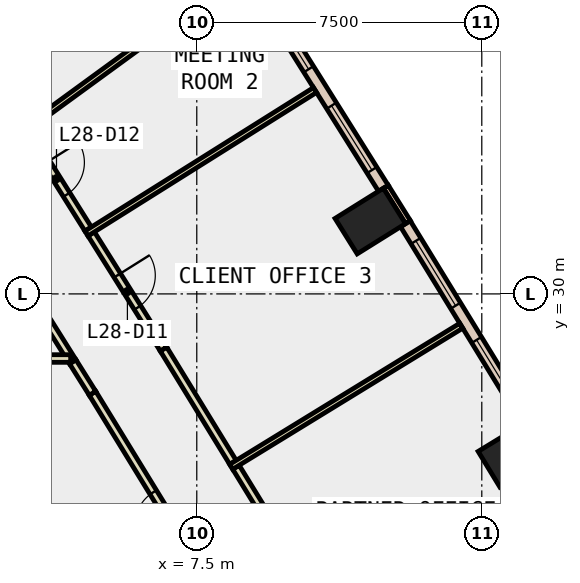
"""IFC4 building model, lengths in metres.
Left out: names, types, materials, properties, quantities, classifications, styles, units other than length and angle.
Written with IfcOpenShell. Run it as: python <this file> out.ifc"""

import sys

from ifc_helpers import new_model, si_unit, direction, frame, frame_2d, origin, origin_2d, place, context, subcontext, project, spatial, rectangle, extrude, element, fill, save


model = new_model("IFC4")
c1 = context("Model", 3, precision=1e-05, world=origin(), true_north=direction((0.0, 1.0)))
c2 = subcontext(c1, "Body", "Model", "MODEL_VIEW")
j1 = project(units=[si_unit("LENGTHUNIT", "METRE"), si_unit("PLANEANGLEUNIT", "RADIAN")], contexts=[c1])
p1 = place(None, origin())
s1 = spatial("IfcSite", under=j1, at=p1, CompositionType="ELEMENT")
p2 = place(p1, origin())
s2 = spatial("IfcBuilding", under=s1, at=p2, CompositionType="ELEMENT")
p3 = place(p2, frame((0.0, 0.0, 128.6)))
s3 = spatial("IfcBuildingStorey", under=s2, at=p3, CompositionType="ELEMENT", Elevation=128.6)
for number, where, z_axis, x_axis in (
    (1, (15.831, 25.776, -0.4), (0.0, 0.0, 1.0), (-0.52, 0.854, 0.0)),
    (2, (12.066, 31.917, -0.4), (0.0, 0.0, 1.0), (-0.53, 0.848, 0.0)),
):
    element("IfcColumn", number, at=place(p3, frame(where, z_axis=z_axis, x_axis=x_axis)), inside=s3, PredefinedType="COLUMN", context=c2, shape_type="SweptSolid", body=[
        extrude(rectangle(XDim=1.1, YDim=1.5, at=origin_2d()), origin(), (0.0, 0.0, 1.0), 4.0),
    ])
p4 = place(p3, frame((13.057, 31.888, 0.0), z_axis=(0.0, 0.0, 1.0), x_axis=(-0.529719642941, 0.848172800721, 0.0)))
e3 = element("IfcWall", 3, at=p4, inside=s3, PredefinedType="STANDARD", context=c2, shape_type="SweptSolid", body=[
    extrude(rectangle(XDim=1.1, YDim=0.15, at=frame_2d((0.55, 0.0))), origin(), (0.0, 0.0, 1.0), 3.6),
])
p5 = place(p3, frame((16.185, 26.634, 0.0), z_axis=(0.0, 0.0, 1.0), x_axis=(-0.522757750181, 0.8524812811, 0.0)))
e4 = element("IfcWall", 4, at=p5, inside=s3, PredefinedType="STANDARD", context=c2, shape_type="SweptSolid", body=[
    extrude(rectangle(XDim=6.114, YDim=0.3, at=frame_2d((3.057, 0.0))), origin(), (0.0, 0.0, 1.0), 3.6),
])
p6 = place(p5, frame((0.528, 0.0, 0.9)))
e5 = element("IfcOpeningElement", 5, at=p6, cuts=e4, PredefinedType="OPENING", context=c2, shape_type="SweptSolid", body=[
    extrude(rectangle(XDim=2.0, YDim=2.6, at=frame_2d((1.0, 1.3))), frame((0.0, 0.16, 0.0), z_axis=(0.0, -1.0, 0.0), x_axis=(1.0, 0.0, 0.0)), (0.0, 0.0, 1.0), 0.32),
])
p7 = place(p5, frame((3.585, 0.0, 0.9)))
e6 = element("IfcOpeningElement", 6, at=p7, cuts=e4, PredefinedType="OPENING", context=c2, shape_type="SweptSolid", body=[
    extrude(rectangle(XDim=2.0, YDim=2.6, at=frame_2d((1.0, 1.3))), frame((0.0, 0.16, 0.0), z_axis=(0.0, -1.0, 0.0), x_axis=(1.0, 0.0, 0.0)), (0.0, 0.0, 1.0), 0.32),
])
p8 = place(p3, frame((12.41, 32.779, 0.0), z_axis=(0.0, 0.0, 1.0), x_axis=(-0.53160564075, 0.846991996847, 0.0)))
e7 = element("IfcWall", 7, at=p8, inside=s3, PredefinedType="STANDARD", context=c2, shape_type="SweptSolid", body=[
    extrude(rectangle(XDim=6.266, YDim=0.3, at=frame_2d((3.133, 0.0))), origin(), (0.0, 0.0, 1.0), 3.6),
])
p9 = place(p8, frame((0.566, 0.0, 0.9)))
e8 = element("IfcOpeningElement", 8, at=p9, cuts=e7, PredefinedType="OPENING", context=c2, shape_type="SweptSolid", body=[
    extrude(rectangle(XDim=2.0, YDim=2.6, at=frame_2d((1.0, 1.3))), frame((0.0, 0.16, 0.0), z_axis=(0.0, -1.0, 0.0), x_axis=(1.0, 0.0, 0.0)), (0.0, 0.0, 1.0), 0.32),
])
p10 = place(p8, frame((3.699, 0.0, 0.9)))
e9 = element("IfcOpeningElement", 9, at=p10, cuts=e7, PredefinedType="OPENING", context=c2, shape_type="SweptSolid", body=[
    extrude(rectangle(XDim=2.0, YDim=2.6, at=frame_2d((1.0, 1.3))), frame((0.0, 0.16, 0.0), z_axis=(0.0, -1.0, 0.0), x_axis=(1.0, 0.0, 0.0)), (0.0, 0.0, 1.0), 0.32),
])
p11 = place(p3, frame((8.475, 21.321, 0.0), z_axis=(0.0, 0.0, 1.0), x_axis=(-0.522743103274, 0.852490262689, 0.0)))
e10 = element("IfcWall", 10, at=p11, inside=s3, PredefinedType="PARTITIONING", context=c2, shape_type="SweptSolid", body=[
    extrude(rectangle(XDim=7.115, YDim=0.2, at=frame_2d((3.557, 0.0))), origin(), (0.0, 0.0, 1.0), 3.6),
])
p12 = place(p11, frame((3.057, 0.0, 0.0)))
e11 = element("IfcOpeningElement", 11, at=p12, cuts=e10, PredefinedType="OPENING", context=c2, shape_type="SweptSolid", body=[
    extrude(rectangle(XDim=1.0, YDim=2.1, at=frame_2d((0.5, 1.05))), frame((0.0, 0.11, 0.0), z_axis=(0.0, -1.0, 0.0), x_axis=(1.0, 0.0, 0.0)), (0.0, 0.0, 1.0), 0.22),
])
p13 = place(p3, frame((4.756, 27.386, 0.0), z_axis=(0.0, 0.0, 1.0), x_axis=(-0.531343659666, 0.84715637006, 0.0)))
e12 = element("IfcWall", 12, at=p13, inside=s3, PredefinedType="PARTITIONING", context=c2, shape_type="SweptSolid", body=[
    extrude(rectangle(XDim=0.979, YDim=0.2, at=frame_2d((0.489, 0.0))), origin(), (0.0, 0.0, 1.0), 3.6),
])
p14 = place(p3, frame((4.236, 28.215, 0.0), z_axis=(0.0, 0.0, 1.0), x_axis=(-0.531602694807, 0.84699384583, 0.0)))
e13 = element("IfcWall", 13, at=p14, inside=s3, PredefinedType="PARTITIONING", context=c2, shape_type="SweptSolid", body=[
    extrude(rectangle(XDim=4.923, YDim=0.2, at=frame_2d((2.461, 0.0))), origin(), (0.0, 0.0, 1.0), 3.6),
])
p15 = place(p14, frame((1.961, 0.0, 0.0)))
e14 = element("IfcOpeningElement", 14, at=p15, cuts=e13, PredefinedType="OPENING", context=c2, shape_type="SweptSolid", body=[
    extrude(rectangle(XDim=1.0, YDim=2.1, at=frame_2d((0.5, 1.05))), frame((0.0, 0.11, 0.0), z_axis=(0.0, -1.0, 0.0), x_axis=(1.0, 0.0, 0.0)), (0.0, 0.0, 1.0), 0.22),
])
p16 = place(p3, frame((8.531, 25.439, 0.0), z_axis=(0.0, 0.0, 1.0), x_axis=(0.522704631836, -0.852513852003, 0.0)))
e15 = element("IfcWall", 15, at=p16, inside=s3, PredefinedType="PARTITIONING", context=c2, shape_type="SweptSolid", body=[
    extrude(rectangle(XDim=3.493, YDim=0.2, at=frame_2d((1.747, 0.0))), origin(), (0.0, 0.0, 1.0), 3.6),
])
p17 = place(p3, frame((4.722, 31.579, 0.0), z_axis=(0.0, 0.0, 1.0), x_axis=(0.531664655861, -0.846954953766, 0.0)))
e16 = element("IfcWall", 16, at=p17, inside=s3, PredefinedType="PARTITIONING", context=c2, shape_type="SweptSolid", body=[
    extrude(rectangle(XDim=3.581, YDim=0.2, at=frame_2d((1.791, 0.0))), origin(), (0.0, 0.0, 1.0), 3.6),
])
p18 = place(p17, frame((1.291, 0.0, 0.0)))
e17 = element("IfcOpeningElement", 17, at=p18, cuts=e16, PredefinedType="OPENING", context=c2, shape_type="SweptSolid", body=[
    extrude(rectangle(XDim=1.0, YDim=2.1, at=frame_2d((0.5, 1.05))), frame((0.0, 0.11, 0.0), z_axis=(0.0, -1.0, 0.0), x_axis=(1.0, 0.0, 0.0)), (0.0, 0.0, 1.0), 0.22),
])
p19 = place(p3, frame((6.626, 28.546, 0.0), z_axis=(0.0, 0.0, 1.0), x_axis=(0.522580081027, -0.852590205734, 0.0)))
e18 = element("IfcWall", 18, at=p19, inside=s3, PredefinedType="PARTITIONING", context=c2, shape_type="SweptSolid", body=[
    extrude(rectangle(XDim=3.494, YDim=0.2, at=frame_2d((1.747, 0.0))), origin(), (0.0, 0.0, 1.0), 3.6),
])
p20 = place(p3, frame((2.975, 34.361, 0.0), z_axis=(0.0, 0.0, 1.0), x_axis=(0.531740854333, -0.846907116414, 0.0)))
e19 = element("IfcWall", 19, at=p20, inside=s3, PredefinedType="PARTITIONING", context=c2, shape_type="SweptSolid", body=[
    extrude(rectangle(XDim=3.135, YDim=0.2, at=frame_2d((1.567, 0.0))), origin(), (0.0, 0.0, 1.0), 3.6),
])
p21 = place(p20, frame((1.068, 0.0, 0.0)))
e20 = element("IfcOpeningElement", 20, at=p21, cuts=e19, PredefinedType="OPENING", context=c2, shape_type="SweptSolid", body=[
    extrude(rectangle(XDim=1.0, YDim=2.1, at=frame_2d((0.5, 1.05))), frame((0.0, 0.11, 0.0), z_axis=(0.0, -1.0, 0.0), x_axis=(1.0, 0.0, 0.0)), (0.0, 0.0, 1.0), 0.22),
])
p22 = place(p3, frame((-0.05, 28.3, 0.0), z_axis=(0.0, 0.0, 1.0), x_axis=(1.0, 0.0, 0.0)))
e21 = element("IfcWall", 21, at=p22, inside=s3, PredefinedType="PARTITIONING", context=c2, shape_type="SweptSolid", body=[
    extrude(rectangle(XDim=4.232, YDim=0.2, at=frame_2d((2.116, 0.0))), origin(), (0.0, 0.0, 1.0), 3.6),
])
p23 = place(p3, frame((8.406, 25.451, 0.0), z_axis=(0.0, 0.0, 1.0), x_axis=(0.852520194289, 0.522694287637, 0.0)))
e22 = element("IfcWall", 22, at=p23, inside=s3, PredefinedType="PARTITIONING", context=c2, shape_type="SweptSolid", body=[
    extrude(rectangle(XDim=7.1, YDim=0.15, at=frame_2d((3.55, 0.0))), origin(), (0.0, 0.0, 1.0), 3.6),
])
p24 = place(p3, frame((4.597, 31.589, 0.0), z_axis=(0.0, 0.0, 1.0), x_axis=(0.846980720953, 0.531623605885, 0.0)))
e23 = element("IfcWall", 23, at=p24, inside=s3, PredefinedType="PARTITIONING", context=c2, shape_type="SweptSolid", body=[
    extrude(rectangle(XDim=7.101, YDim=0.15, at=frame_2d((3.55, 0.0))), origin(), (0.0, 0.0, 1.0), 3.6),
])
p25 = place(p3, frame((2.908, 34.281, 0.0), z_axis=(0.0, 0.0, 1.0), x_axis=(0.807935867, 0.589270425879, 0.0)))
e24 = element("IfcWall", 24, at=p25, inside=s3, PredefinedType="PARTITIONING", context=c2, shape_type="SweptSolid", body=[
    extrude(rectangle(XDim=5.744, YDim=0.15, at=frame_2d((2.872, 0.0))), origin(), (0.0, 0.0, 1.0), 3.6),
])
p26 = place(p6, origin())
e25 = element("IfcWindow", 25, at=p26, inside=s3, PartitioningType="SINGLE_PANEL", PredefinedType="WINDOW", context=c2, shape_type="SweptSolid", body=[
    extrude(rectangle(XDim=2.0, YDim=2.6, at=frame_2d((1.0, 1.3))), frame((0.0, 0.03, 0.0), z_axis=(0.0, -1.0, 0.0), x_axis=(1.0, 0.0, 0.0)), (0.0, 0.0, 1.0), 0.06),
])
fill(e5, e25)
p27 = place(p7, origin())
e26 = element("IfcWindow", 26, at=p27, inside=s3, PartitioningType="SINGLE_PANEL", PredefinedType="WINDOW", context=c2, shape_type="SweptSolid", body=[
    extrude(rectangle(XDim=2.0, YDim=2.6, at=frame_2d((1.0, 1.3))), frame((0.0, 0.03, 0.0), z_axis=(0.0, -1.0, 0.0), x_axis=(1.0, 0.0, 0.0)), (0.0, 0.0, 1.0), 0.06),
])
fill(e6, e26)
p28 = place(p9, origin())
e27 = element("IfcWindow", 27, at=p28, inside=s3, PartitioningType="SINGLE_PANEL", PredefinedType="WINDOW", context=c2, shape_type="SweptSolid", body=[
    extrude(rectangle(XDim=2.0, YDim=2.6, at=frame_2d((1.0, 1.3))), frame((0.0, 0.03, 0.0), z_axis=(0.0, -1.0, 0.0), x_axis=(1.0, 0.0, 0.0)), (0.0, 0.0, 1.0), 0.06),
])
fill(e8, e27)
p29 = place(p10, origin())
e28 = element("IfcWindow", 28, at=p29, inside=s3, PartitioningType="SINGLE_PANEL", PredefinedType="WINDOW", context=c2, shape_type="SweptSolid", body=[
    extrude(rectangle(XDim=2.0, YDim=2.6, at=frame_2d((1.0, 1.3))), frame((0.0, 0.03, 0.0), z_axis=(0.0, -1.0, 0.0), x_axis=(1.0, 0.0, 0.0)), (0.0, 0.0, 1.0), 0.06),
])
fill(e9, e28)
p30 = place(p18, origin())
e29 = element("IfcDoor", 29, at=p30, inside=s3, OperationType="SINGLE_SWING_LEFT", PredefinedType="DOOR", context=c2, shape_type="SweptSolid", body=[
    extrude(rectangle(XDim=1.0, YDim=2.1, at=frame_2d((0.5, 1.05))), frame((0.0, 0.025, 0.0), z_axis=(0.0, -1.0, 0.0), x_axis=(1.0, 0.0, 0.0)), (0.0, 0.0, 1.0), 0.05),
])
fill(e17, e29)
p31 = place(p21, origin())
e30 = element("IfcDoor", 30, at=p31, inside=s3, OperationType="SINGLE_SWING_LEFT", PredefinedType="DOOR", context=c2, shape_type="SweptSolid", body=[
    extrude(rectangle(XDim=1.0, YDim=2.1, at=frame_2d((0.5, 1.05))), frame((0.0, 0.025, 0.0), z_axis=(0.0, -1.0, 0.0), x_axis=(1.0, 0.0, 0.0)), (0.0, 0.0, 1.0), 0.05),
])
fill(e20, e30)
p32 = place(p12, origin())
e31 = element("IfcDoor", 31, at=p32, inside=s3, OperationType="SINGLE_SWING_RIGHT", PredefinedType="DOOR", context=c2, shape_type="SweptSolid", body=[
    extrude(rectangle(XDim=1.0, YDim=2.1, at=frame_2d((0.5, 1.05))), frame((0.0, 0.025, 0.0), z_axis=(0.0, -1.0, 0.0), x_axis=(1.0, 0.0, 0.0)), (0.0, 0.0, 1.0), 0.05),
])
fill(e11, e31)
save(model, sys.argv[1])
